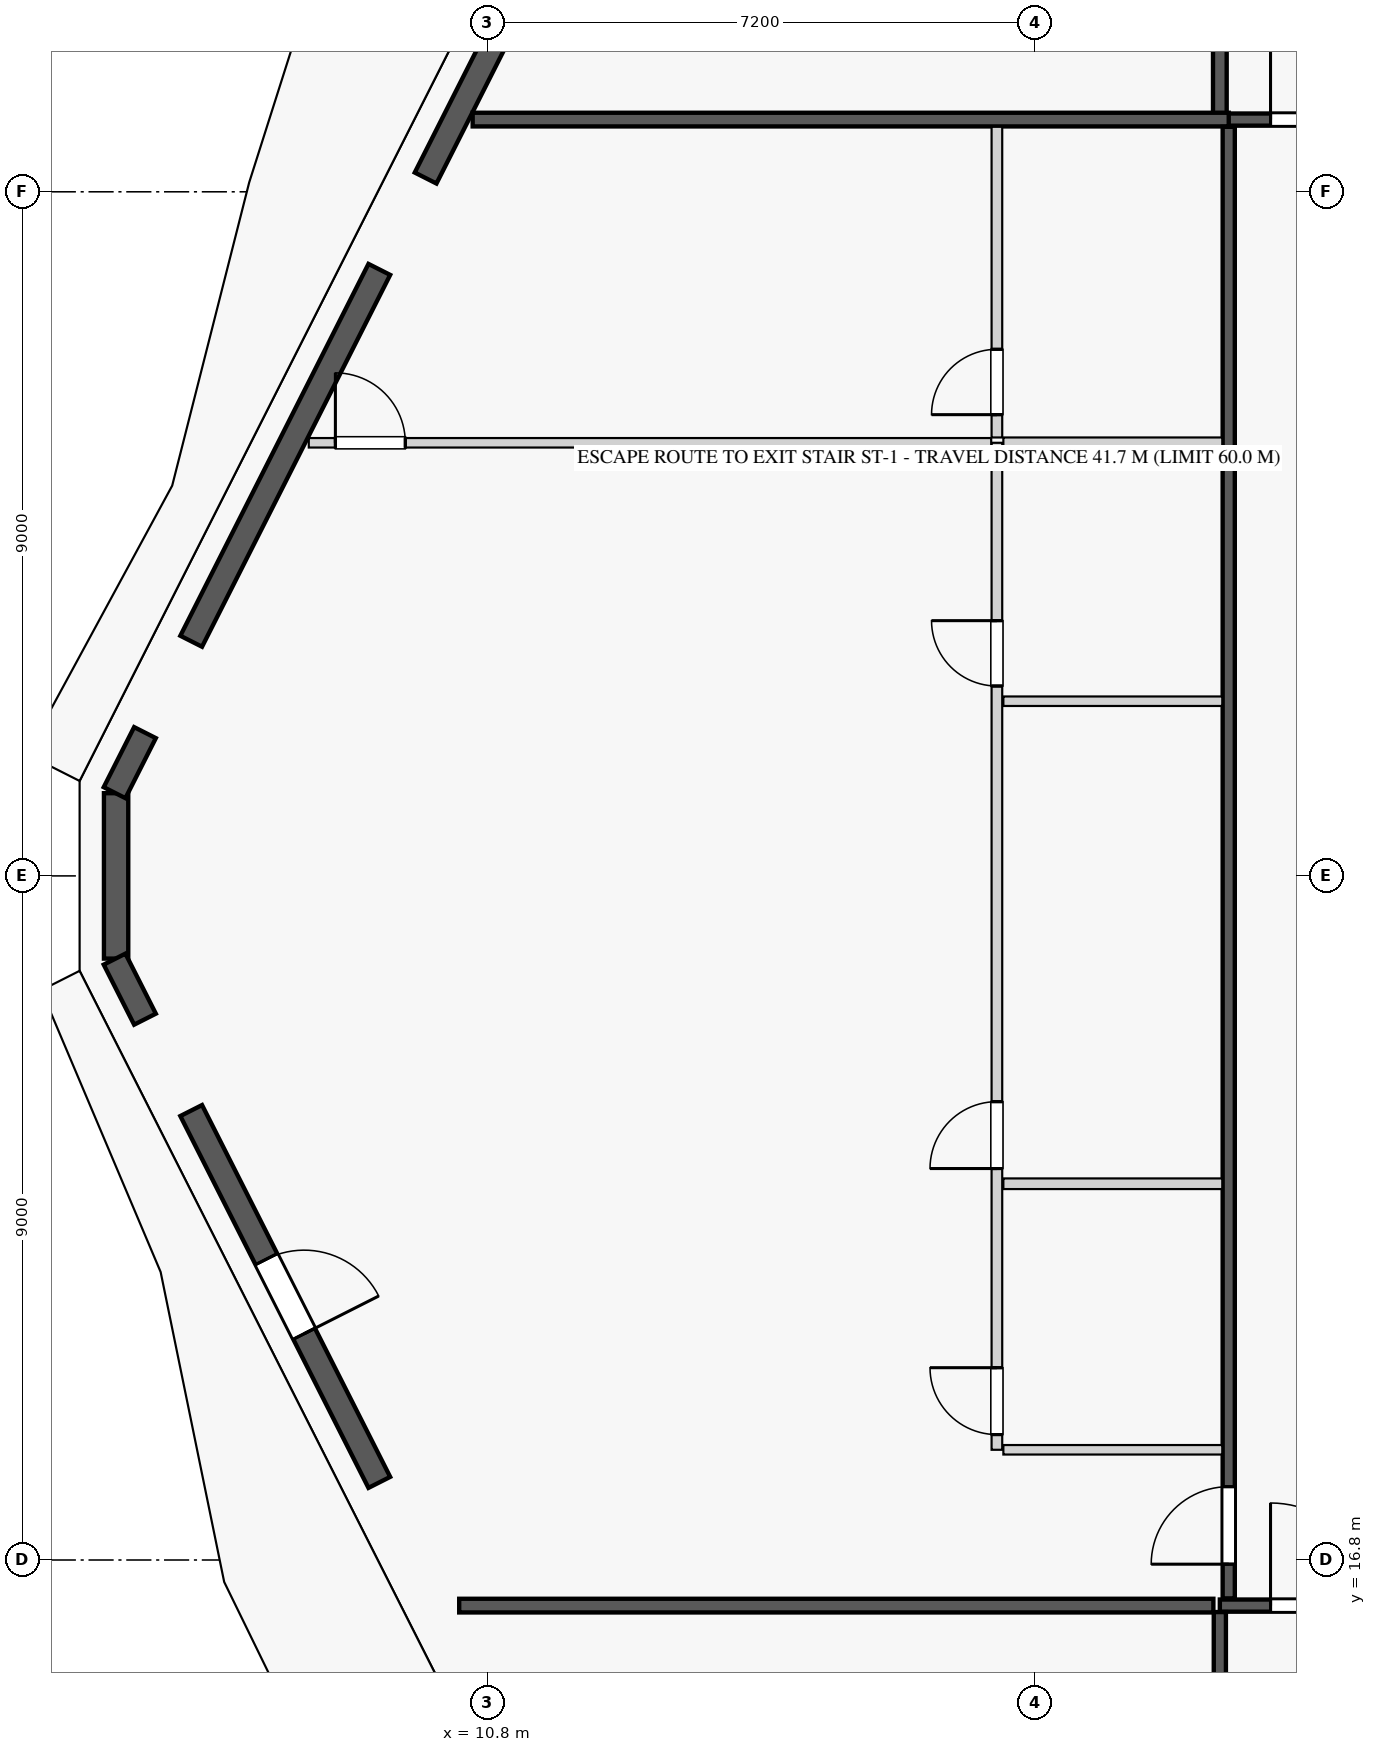
"""IFC4 building model, lengths in metres.
Left out: names, types, materials, properties, quantities, classifications, styles, units other than length and angle.
Written with IfcOpenShell. Run it as: python <this file> out.ifc"""

import sys

from ifc_helpers import new_model, si_unit, direction, frame, frame_2d, origin, origin_2d, place, context, subcontext, project, spatial, rectangle, extrude, element, fill, save


model = new_model("IFC4")
c1 = context("Model", 3, precision=1e-05, world=origin(), true_north=direction((0.0, 1.0)))
c2 = subcontext(c1, "Body", "Model", "MODEL_VIEW")
j1 = project(units=[si_unit("LENGTHUNIT", "METRE"), si_unit("PLANEANGLEUNIT", "RADIAN")], contexts=[c1])
p1 = place(None, origin())
s1 = spatial("IfcSite", under=j1, at=p1, CompositionType="ELEMENT")
p2 = place(p1, origin())
s2 = spatial("IfcBuilding", under=s1, at=p2, CompositionType="ELEMENT")
p3 = place(p2, frame((0.0, 0.0, 94.2)))
s3 = spatial("IfcBuildingStorey", under=s2, at=p3, CompositionType="ELEMENT", Elevation=94.2)
for number, where, z_axis, x_axis in (
    (1, (9.754, 34.38, 0.0), (0.0, 0.0, 1.0), (1.0, 0.0, 0.0)),
    (2, (6.632, 28.286, 0.0), (0.0, 0.0, 1.0), (1.0, 0.0, 0.0)),
    (3, (6.632, 23.314, 0.0), (0.0, 0.0, 1.0), (1.0, 0.0, 0.0)),
    (4, (9.754, 17.22, 0.0), (0.0, 0.0, 1.0), (1.0, 0.0, 0.0)),
):
    element("IfcColumn", number, at=place(p3, frame(where, z_axis=z_axis, x_axis=x_axis)), inside=s3, PredefinedType="COLUMN", context=c2, shape_type="SweptSolid", body=[
        extrude(rectangle(XDim=1.05, YDim=1.05, at=origin_2d()), origin(), (0.0, 0.0, 1.0), 4.2),
    ])
p4 = place(p3, frame((6.632, 25.8, 0.0), z_axis=(0.0, 0.0, 1.0), x_axis=(0.0, -1.0, 0.0)))
e5 = element("IfcColumn", 5, at=p4, inside=s3, PredefinedType="PILASTER", context=c2, shape_type="SweptSolid", body=[
    extrude(rectangle(XDim=0.5, YDim=0.35, at=origin_2d()), origin(), (0.0, 0.0, 1.0), 4.2),
])
p5 = place(p3, frame((5.912, 26.888, 0.0), z_axis=(0.0, 0.0, 1.0), x_axis=(0.0, -1.0, 0.0)))
e6 = element("IfcWall", 6, at=p5, inside=s3, PredefinedType="STANDARD", context=c2, shape_type="SweptSolid", body=[
    extrude(rectangle(XDim=2.176, YDim=0.32, at=frame_2d((1.088, 0.0))), origin(), (0.0, 0.0, 1.0), 3.99),
])
p6 = place(p3, frame((12.569, 40.09, 0.0), z_axis=(0.0, 0.0, 1.0), x_axis=(-0.451489285948, -0.89227654047, 0.0)))
e7 = element("IfcWall", 7, at=p6, inside=s3, PredefinedType="STANDARD", context=c2, shape_type="SweptSolid", body=[
    extrude(rectangle(XDim=5.726, YDim=0.32, at=frame_2d((2.863, 0.0))), origin(), (0.0, 0.0, 1.0), 2.59),
])
p7 = place(p6, frame((1.76, 0.0, 0.0)))
e8 = element("IfcOpeningElement", 8, at=p7, cuts=e7, PredefinedType="OPENING", context=c2, shape_type="SweptSolid", body=[
    extrude(rectangle(XDim=1.1, YDim=2.25, at=frame_2d((0.55, 1.125))), frame((0.0, 0.17, 0.0), z_axis=(0.0, -1.0, 0.0), x_axis=(1.0, 0.0, 0.0)), (0.0, 0.0, 1.0), 0.34),
])
p8 = place(p3, frame((9.375, 33.779, 0.0), z_axis=(0.0, 0.0, 1.0), x_axis=(-0.451447853766, -0.892297503824, 0.0)))
e9 = element("IfcWall", 9, at=p8, inside=s3, PredefinedType="STANDARD", context=c2, shape_type="SweptSolid", body=[
    extrude(rectangle(XDim=5.483, YDim=0.32, at=frame_2d((2.741, 0.0))), origin(), (0.0, 0.0, 1.0), 2.59),
])
p9 = place(p8, frame((0.617, 0.0, 0.75)))
e10 = element("IfcOpeningElement", 10, at=p9, cuts=e9, PredefinedType="OPENING", context=c2, shape_type="SweptSolid", body=[
    extrude(rectangle(XDim=1.1, YDim=1.69, at=frame_2d((0.55, 0.845))), frame((0.0, 0.17, 0.0), z_axis=(0.0, -1.0, 0.0), x_axis=(1.0, 0.0, 0.0)), (0.0, 0.0, 1.0), 0.34),
])
p10 = place(p8, frame((3.478, 0.0, 0.75)))
e11 = element("IfcOpeningElement", 11, at=p10, cuts=e9, PredefinedType="OPENING", context=c2, shape_type="SweptSolid", body=[
    extrude(rectangle(XDim=1.1, YDim=1.56, at=frame_2d((0.55, 0.78))), frame((0.0, 0.17, 0.0), z_axis=(0.0, -1.0, 0.0), x_axis=(1.0, 0.0, 0.0)), (0.0, 0.0, 1.0), 0.34),
])
for number, where, z_axis, x_axis in (
    (12, (6.292, 27.685, 0.0), (0.0, 0.0, 1.0), (-0.452, -0.892, 0.0)),
    (13, (5.892, 24.705, 0.0), (0.0, 0.0, 1.0), (0.452, -0.892, 0.0)),
):
    element("IfcWall", number, at=place(p3, frame(where, z_axis=z_axis, x_axis=x_axis)), inside=s3, PredefinedType="STANDARD", context=c2, shape_type="SweptSolid", body=[
        extrude(rectangle(XDim=0.885, YDim=0.32, at=frame_2d((0.443, 0.0))), origin(), (0.0, 0.0, 1.0), 3.99),
    ])
p11 = place(p3, frame((6.9, 22.713, 0.0), z_axis=(0.0, 0.0, 1.0), x_axis=(0.451465792328, -0.892288427784, 0.0)))
e14 = element("IfcWall", 14, at=p11, inside=s3, PredefinedType="STANDARD", context=c2, shape_type="SweptSolid", body=[
    extrude(rectangle(XDim=5.482, YDim=0.32, at=frame_2d((2.741, 0.0))), origin(), (0.0, 0.0, 1.0), 2.59),
])
p12 = place(p11, frame((2.191, 0.0, 0.0)))
e15 = element("IfcOpeningElement", 15, at=p12, cuts=e14, PredefinedType="OPENING", context=c2, shape_type="SweptSolid", body=[
    extrude(rectangle(XDim=1.1, YDim=2.25, at=frame_2d((0.55, 1.125))), frame((0.0, 0.17, 0.0), z_axis=(0.0, -1.0, 0.0), x_axis=(1.0, 0.0, 0.0)), (0.0, 0.0, 1.0), 0.34),
])
p13 = place(p3, frame((20.433, 16.2, 0.0), z_axis=(0.0, 0.0, 1.0), x_axis=(1.0, 0.0, 0.0)))
e16 = element("IfcWall", 16, at=p13, inside=s3, PredefinedType="PARTITIONING", context=c2, shape_type="SweptSolid", body=[
    extrude(rectangle(XDim=23.934, YDim=0.16, at=frame_2d((11.967, 0.0))), origin(), (0.0, 0.0, 1.0), 3.99),
])
p14 = place(p13, frame((0.667, 0.0, 0.0)))
e17 = element("IfcOpeningElement", 17, at=p14, cuts=e16, PredefinedType="OPENING", context=c2, shape_type="SweptSolid", body=[
    extrude(rectangle(XDim=1.35, YDim=2.35, at=frame_2d((0.675, 1.175))), frame((0.0, 0.09, 0.0), z_axis=(0.0, -1.0, 0.0), x_axis=(1.0, 0.0, 0.0)), (0.0, 0.0, 1.0), 0.18),
])
p15 = place(p13, frame((14.039, 0.0, 0.0)))
e18 = element("IfcOpeningElement", 18, at=p15, cuts=e16, PredefinedType="OPENING", context=c2, shape_type="SweptSolid", body=[
    extrude(rectangle(XDim=1.35, YDim=2.35, at=frame_2d((0.675, 1.175))), frame((0.0, 0.09, 0.0), z_axis=(0.0, -1.0, 0.0), x_axis=(1.0, 0.0, 0.0)), (0.0, 0.0, 1.0), 0.18),
])
p16 = place(p3, frame((20.433, 2.365, 0.0), z_axis=(0.0, 0.0, 1.0), x_axis=(0.0, 1.0, 0.0)))
e19 = element("IfcWall", 19, at=p16, inside=s3, PredefinedType="PARTITIONING", context=c2, shape_type="SweptSolid", body=[
    extrude(rectangle(XDim=13.75, YDim=0.16, at=frame_2d((6.875, 0.0))), origin(), (0.0, 0.0, 1.0), 2.59),
])
p17 = place(p3, frame((20.433, 35.75, 0.0), z_axis=(0.0, 0.0, 1.0), x_axis=(0.0, 1.0, 0.0)))
e20 = element("IfcWall", 20, at=p17, inside=s3, PredefinedType="PARTITIONING", context=c2, shape_type="SweptSolid", body=[
    extrude(rectangle(XDim=13.485, YDim=0.18, at=frame_2d((6.743, 0.0))), origin(), (0.0, 0.0, 1.0), 2.59),
])
p18 = place(p3, frame((20.528, 35.75, 0.0), z_axis=(0.0, 0.0, 1.0), x_axis=(1.0, 0.0, 0.0)))
e21 = element("IfcWall", 21, at=p18, inside=s3, PredefinedType="PARTITIONING", context=c2, shape_type="SweptSolid", body=[
    extrude(rectangle(XDim=15.899, YDim=0.16, at=frame_2d((7.949, 0.0))), origin(), (0.0, 0.0, 1.0), 3.99),
])
p19 = place(p18, frame((0.572, 0.0, 0.0)))
e22 = element("IfcOpeningElement", 22, at=p19, cuts=e21, PredefinedType="OPENING", context=c2, shape_type="SweptSolid", body=[
    extrude(rectangle(XDim=1.35, YDim=2.35, at=frame_2d((0.675, 1.175))), frame((0.0, 0.09, 0.0), z_axis=(0.0, -1.0, 0.0), x_axis=(1.0, 0.0, 0.0)), (0.0, 0.0, 1.0), 0.18),
])
p20 = place(p3, frame((10.426, 16.2, 0.0), z_axis=(0.0, 0.0, 1.0), x_axis=(1.0, 0.0, 0.0)))
e23 = element("IfcWall", 23, at=p20, inside=s3, PredefinedType="PARTITIONING", context=c2, shape_type="SweptSolid", body=[
    extrude(rectangle(XDim=9.922, YDim=0.18, at=frame_2d((4.961, 0.0))), origin(), (0.0, 0.0, 1.0), 3.99),
])
p21 = place(p3, frame((10.603, 35.75, 0.0), z_axis=(0.0, 0.0, 1.0), x_axis=(1.0, 0.0, 0.0)))
e24 = element("IfcWall", 24, at=p21, inside=s3, PredefinedType="PARTITIONING", context=c2, shape_type="SweptSolid", body=[
    extrude(rectangle(XDim=9.947, YDim=0.18, at=frame_2d((4.974, 0.0))), origin(), (0.0, 0.0, 1.0), 3.99),
])
p22 = place(p3, frame((20.55, 16.295, 0.0), z_axis=(0.0, 0.0, 1.0), x_axis=(0.0, 1.0, 0.0)))
e25 = element("IfcWall", 25, at=p22, inside=s3, PredefinedType="PARTITIONING", context=c2, shape_type="SweptSolid", body=[
    extrude(rectangle(XDim=19.36, YDim=0.16, at=frame_2d((9.68, 0.0))), origin(), (0.0, 0.0, 1.0), 2.59),
])
p23 = place(p22, frame((0.45, 0.0, 0.0)))
e26 = element("IfcOpeningElement", 26, at=p23, cuts=e25, PredefinedType="OPENING", context=c2, shape_type="SweptSolid", body=[
    extrude(rectangle(XDim=1.02, YDim=2.25, at=frame_2d((0.51, 1.125))), frame((0.0, 0.09, 0.0), z_axis=(0.0, -1.0, 0.0), x_axis=(1.0, 0.0, 0.0)), (0.0, 0.0, 1.0), 0.18),
])
p24 = place(p3, frame((17.585, 18.25, 0.0), z_axis=(0.0, 0.0, 1.0), x_axis=(1.0, 0.0, 0.0)))
e27 = element("IfcWall", 27, at=p24, inside=s3, PredefinedType="PARTITIONING", context=c2, shape_type="SweptSolid", body=[
    extrude(rectangle(XDim=2.88, YDim=0.125, at=frame_2d((1.44, 0.0))), origin(), (0.0, 0.0, 1.0), 2.59),
])
p25 = place(p3, frame((17.5, 18.25, 0.0), z_axis=(0.0, 0.0, 1.0), x_axis=(0.0, 1.0, 0.0)))
e28 = element("IfcWall", 28, at=p25, inside=s3, PredefinedType="PLUMBINGWALL", context=c2, shape_type="SweptSolid", body=[
    extrude(rectangle(XDim=13.248, YDim=0.14, at=frame_2d((6.624, 0.0))), origin(), (0.0, 0.0, 1.0), 3.99),
])
p26 = place(p25, frame((0.2, 0.0, 0.0)))
e29 = element("IfcOpeningElement", 29, at=p26, cuts=e28, PredefinedType="OPENING", context=c2, shape_type="SweptSolid", body=[
    extrude(rectangle(XDim=0.88, YDim=2.15, at=frame_2d((0.44, 1.075))), frame((0.0, 0.08, 0.0), z_axis=(0.0, -1.0, 0.0), x_axis=(1.0, 0.0, 0.0)), (0.0, 0.0, 1.0), 0.16),
])
p27 = place(p25, frame((3.7, 0.0, 0.0)))
e30 = element("IfcOpeningElement", 30, at=p27, cuts=e28, PredefinedType="OPENING", context=c2, shape_type="SweptSolid", body=[
    extrude(rectangle(XDim=0.88, YDim=2.15, at=frame_2d((0.44, 1.075))), frame((0.0, 0.08, 0.0), z_axis=(0.0, -1.0, 0.0), x_axis=(1.0, 0.0, 0.0)), (0.0, 0.0, 1.0), 0.16),
])
p28 = place(p25, frame((10.048, 0.0, 0.0)))
e31 = element("IfcOpeningElement", 31, at=p28, cuts=e28, PredefinedType="OPENING", context=c2, shape_type="SweptSolid", body=[
    extrude(rectangle(XDim=0.86, YDim=2.1, at=frame_2d((0.43, 1.05))), frame((0.0, 0.08, 0.0), z_axis=(0.0, -1.0, 0.0), x_axis=(1.0, 0.0, 0.0)), (0.0, 0.0, 1.0), 0.16),
])
p29 = place(p3, frame((17.5, 31.568, 0.0), z_axis=(0.0, 0.0, 1.0), x_axis=(0.0, 1.0, 0.0)))
e32 = element("IfcWall", 32, at=p29, inside=s3, PredefinedType="PLUMBINGWALL", context=c2, shape_type="SweptSolid", body=[
    extrude(rectangle(XDim=4.087, YDim=0.14, at=frame_2d((2.043, 0.0))), origin(), (0.0, 0.0, 1.0), 3.99),
])
p30 = place(p29, frame((0.3, 0.0, 0.0)))
e33 = element("IfcOpeningElement", 33, at=p30, cuts=e32, PredefinedType="OPENING", context=c2, shape_type="SweptSolid", body=[
    extrude(rectangle(XDim=0.86, YDim=2.1, at=frame_2d((0.43, 1.05))), frame((0.0, 0.08, 0.0), z_axis=(0.0, -1.0, 0.0), x_axis=(1.0, 0.0, 0.0)), (0.0, 0.0, 1.0), 0.16),
])
p31 = place(p3, frame((17.585, 31.498, 0.0), z_axis=(0.0, 0.0, 1.0), x_axis=(1.0, 0.0, 0.0)))
e34 = element("IfcWall", 34, at=p31, inside=s3, PredefinedType="PLUMBINGWALL", context=c2, shape_type="SweptSolid", body=[
    extrude(rectangle(XDim=2.88, YDim=0.14, at=frame_2d((1.44, 0.0))), origin(), (0.0, 0.0, 1.0), 3.99),
])
p32 = place(p3, frame((8.447, 31.498, 0.0), z_axis=(0.0, 0.0, 1.0), x_axis=(1.0, 0.0, 0.0)))
e35 = element("IfcWall", 35, at=p32, inside=s3, PredefinedType="PARTITIONING", context=c2, shape_type="SweptSolid", body=[
    extrude(rectangle(XDim=8.978, YDim=0.125, at=frame_2d((4.489, 0.0))), origin(), (0.0, 0.0, 1.0), 3.99),
])
p33 = place(p32, frame((0.35, 0.0, 0.0)))
e36 = element("IfcOpeningElement", 36, at=p33, cuts=e35, PredefinedType="OPENING", context=c2, shape_type="SweptSolid", body=[
    extrude(rectangle(XDim=0.92, YDim=2.15, at=frame_2d((0.46, 1.075))), frame((0.0, 0.073, 0.0), z_axis=(0.0, -1.0, 0.0), x_axis=(1.0, 0.0, 0.0)), (0.0, 0.0, 1.0), 0.145),
])
p34 = place(p3, frame((17.585, 21.75, 0.0), z_axis=(0.0, 0.0, 1.0), x_axis=(1.0, 0.0, 0.0)))
e37 = element("IfcWall", 37, at=p34, inside=s3, PredefinedType="PLUMBINGWALL", context=c2, shape_type="SweptSolid", body=[
    extrude(rectangle(XDim=2.88, YDim=0.14, at=frame_2d((1.44, 0.0))), origin(), (0.0, 0.0, 1.0), 3.99),
])
p35 = place(p3, frame((17.585, 28.098, 0.0), z_axis=(0.0, 0.0, 1.0), x_axis=(1.0, 0.0, 0.0)))
e38 = element("IfcWall", 38, at=p35, inside=s3, PredefinedType="PARTITIONING", context=c2, shape_type="SweptSolid", body=[
    extrude(rectangle(XDim=2.88, YDim=0.125, at=frame_2d((1.44, 0.0))), origin(), (0.0, 0.0, 1.0), 2.59),
])
p36 = place(p9, origin())
e39 = element("IfcWindow", 39, at=p36, inside=s3, PartitioningType="SINGLE_PANEL", PredefinedType="WINDOW", context=c2, shape_type="SweptSolid", body=[
    extrude(rectangle(XDim=1.1, YDim=1.69, at=frame_2d((0.55, 0.845))), frame((0.0, 0.03, 0.0), z_axis=(0.0, -1.0, 0.0), x_axis=(1.0, 0.0, 0.0)), (0.0, 0.0, 1.0), 0.06),
])
fill(e10, e39)
p37 = place(p12, origin())
e40 = element("IfcDoor", 40, at=p37, inside=s3, OperationType="SINGLE_SWING_RIGHT", PredefinedType="DOOR", context=c2, shape_type="SweptSolid", body=[
    extrude(rectangle(XDim=1.1, YDim=2.25, at=frame_2d((0.55, 1.125))), frame((0.0, 0.025, 0.0), z_axis=(0.0, -1.0, 0.0), x_axis=(1.0, 0.0, 0.0)), (0.0, 0.0, 1.0), 0.05),
])
fill(e15, e40)
p38 = place(p14, origin())
e41 = element("IfcDoor", 41, at=p38, inside=s3, OperationType="SINGLE_SWING_LEFT", PredefinedType="DOOR", context=c2, shape_type="SweptSolid", body=[
    extrude(rectangle(XDim=1.35, YDim=2.35, at=frame_2d((0.675, 1.175))), frame((0.0, 0.025, 0.0), z_axis=(0.0, -1.0, 0.0), x_axis=(1.0, 0.0, 0.0)), (0.0, 0.0, 1.0), 0.05),
])
fill(e17, e41)
p39 = place(p19, origin())
e42 = element("IfcDoor", 42, at=p39, inside=s3, OperationType="SINGLE_SWING_LEFT", PredefinedType="DOOR", context=c2, shape_type="SweptSolid", body=[
    extrude(rectangle(XDim=1.35, YDim=2.35, at=frame_2d((0.675, 1.175))), frame((0.0, 0.025, 0.0), z_axis=(0.0, -1.0, 0.0), x_axis=(1.0, 0.0, 0.0)), (0.0, 0.0, 1.0), 0.05),
])
fill(e22, e42)
p40 = place(p26, origin())
e43 = element("IfcDoor", 43, at=p40, inside=s3, OperationType="SINGLE_SWING_RIGHT", PredefinedType="DOOR", context=c2, shape_type="SweptSolid", body=[
    extrude(rectangle(XDim=0.88, YDim=2.15, at=frame_2d((0.44, 1.075))), frame((0.0, 0.025, 0.0), z_axis=(0.0, -1.0, 0.0), x_axis=(1.0, 0.0, 0.0)), (0.0, 0.0, 1.0), 0.05),
])
fill(e29, e43)
p41 = place(p27, origin())
e44 = element("IfcDoor", 44, at=p41, inside=s3, OperationType="SINGLE_SWING_LEFT", PredefinedType="DOOR", context=c2, shape_type="SweptSolid", body=[
    extrude(rectangle(XDim=0.88, YDim=2.15, at=frame_2d((0.44, 1.075))), frame((0.0, 0.025, 0.0), z_axis=(0.0, -1.0, 0.0), x_axis=(1.0, 0.0, 0.0)), (0.0, 0.0, 1.0), 0.05),
])
fill(e30, e44)
p42 = place(p28, origin())
e45 = element("IfcDoor", 45, at=p42, inside=s3, OperationType="SINGLE_SWING_RIGHT", PredefinedType="DOOR", context=c2, shape_type="SweptSolid", body=[
    extrude(rectangle(XDim=0.86, YDim=2.1, at=frame_2d((0.43, 1.05))), frame((0.0, 0.025, 0.0), z_axis=(0.0, -1.0, 0.0), x_axis=(1.0, 0.0, 0.0)), (0.0, 0.0, 1.0), 0.05),
])
fill(e31, e45)
p43 = place(p30, origin())
e46 = element("IfcDoor", 46, at=p43, inside=s3, OperationType="SINGLE_SWING_LEFT", PredefinedType="DOOR", context=c2, shape_type="SweptSolid", body=[
    extrude(rectangle(XDim=0.86, YDim=2.1, at=frame_2d((0.43, 1.05))), frame((0.0, 0.025, 0.0), z_axis=(0.0, -1.0, 0.0), x_axis=(1.0, 0.0, 0.0)), (0.0, 0.0, 1.0), 0.05),
])
fill(e33, e46)
p44 = place(p23, origin())
e47 = element("IfcDoor", 47, at=p44, inside=s3, OperationType="SINGLE_SWING_LEFT", PredefinedType="DOOR", context=c2, shape_type="SweptSolid", body=[
    extrude(rectangle(XDim=1.02, YDim=2.25, at=frame_2d((0.51, 1.125))), frame((0.0, 0.025, 0.0), z_axis=(0.0, -1.0, 0.0), x_axis=(1.0, 0.0, 0.0)), (0.0, 0.0, 1.0), 0.05),
])
fill(e26, e47)
p45 = place(p33, origin())
e48 = element("IfcDoor", 48, at=p45, inside=s3, OperationType="SINGLE_SWING_LEFT", PredefinedType="DOOR", context=c2, shape_type="SweptSolid", body=[
    extrude(rectangle(XDim=0.92, YDim=2.15, at=frame_2d((0.46, 1.075))), frame((0.0, 0.025, 0.0), z_axis=(0.0, -1.0, 0.0), x_axis=(1.0, 0.0, 0.0)), (0.0, 0.0, 1.0), 0.05),
])
fill(e36, e48)
p46 = place(p10, origin())
e49 = element("IfcWindow", 49, at=p46, inside=s3, PartitioningType="SINGLE_PANEL", PredefinedType="WINDOW", context=c2, shape_type="SweptSolid", body=[
    extrude(rectangle(XDim=1.1, YDim=1.56, at=frame_2d((0.55, 0.78))), frame((0.0, 0.03, 0.0), z_axis=(0.0, -1.0, 0.0), x_axis=(1.0, 0.0, 0.0)), (0.0, 0.0, 1.0), 0.06),
])
fill(e11, e49)
save(model, sys.argv[1])
